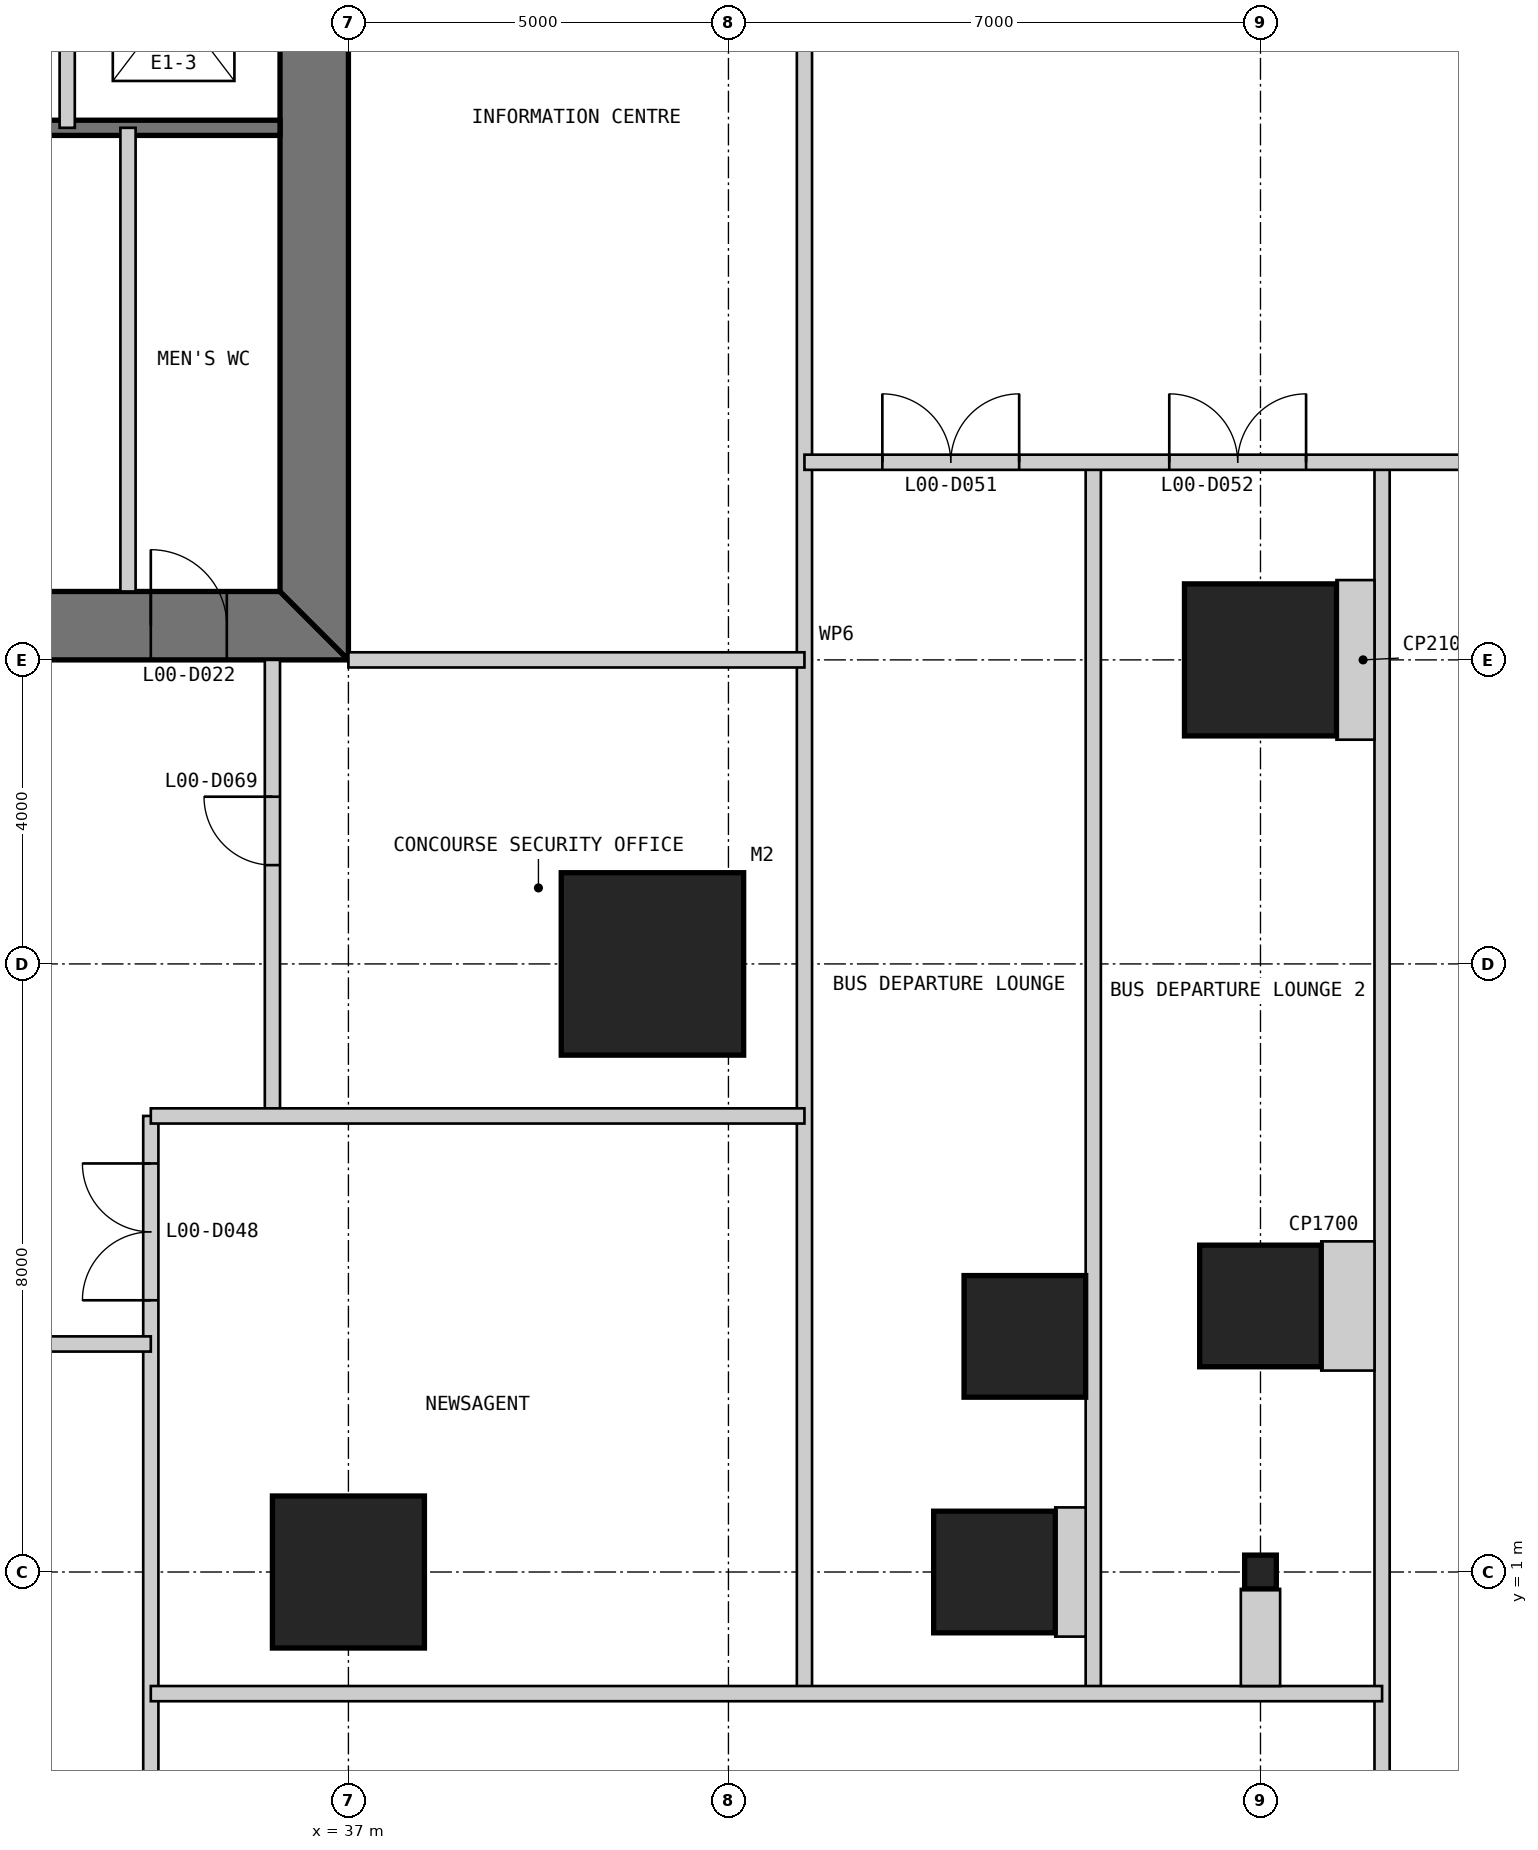
"""IFC4 building model, lengths in metres.
Left out: names, types, materials, properties, quantities, classifications, styles, units other than length and angle.
Written with IfcOpenShell. Run it as: python <this file> out.ifc"""

import sys

from ifc_helpers import new_model, si_unit, direction, frame, frame_2d, origin, origin_2d, place, context, subcontext, project, spatial, polyline, rectangle, i_section, outline, extrude, element, fill, save


model = new_model("IFC4")
c1 = context("Model", 3, precision=1e-05, world=origin(), true_north=direction((0.0, 1.0)))
c2 = subcontext(c1, "Body", "Model", "MODEL_VIEW")
j1 = project(units=[si_unit("LENGTHUNIT", "METRE"), si_unit("PLANEANGLEUNIT", "RADIAN")], contexts=[c1])
p1 = place(None, origin())
s1 = spatial("IfcSite", under=j1, at=p1, CompositionType="ELEMENT")
p2 = place(p1, origin())
s2 = spatial("IfcBuilding", under=s1, at=p2, CompositionType="ELEMENT")
p3 = place(p2, origin())
s3 = spatial("IfcBuildingStorey", under=s2, at=p3, CompositionType="ELEMENT", Elevation=0.0)
p4 = place(p3, frame((41.0, 9.0, 0.0), z_axis=(0.0, 0.0, 1.0), x_axis=(1.0, 0.0, 0.0)))
e1 = element("IfcColumn", 1, at=p4, inside=s3, PredefinedType="COLUMN", context=c2, shape_type="SweptSolid", body=[
    extrude(rectangle(XDim=2.4, YDim=2.4, at=origin_2d()), origin(), (0.0, 0.0, 1.0), 7.0),
])
p5 = place(p3, frame((37.0, 1.0, 0.0), z_axis=(0.0, 0.0, 1.0), x_axis=(1.0, 0.0, 0.0)))
e2 = element("IfcColumn", 2, at=p5, inside=s3, PredefinedType="COLUMN", context=c2, shape_type="SweptSolid", body=[
    extrude(rectangle(XDim=2.0, YDim=2.0, at=origin_2d()), origin(), (0.0, 0.0, 1.0), 7.0),
])
for number, where, z_axis, x_axis in (
    (3, (45.5, 1.0, 0.0), (0.0, 0.0, 1.0), (1.0, 0.0, 0.0)),
    (4, (45.9, 4.1, 0.0), (0.0, 0.0, 1.0), (1.0, 0.0, 0.0)),
    (5, (49.0, 4.5, 0.0), (0.0, 0.0, 1.0), (1.0, 0.0, 0.0)),
):
    element("IfcColumn", number, at=place(p3, frame(where, z_axis=z_axis, x_axis=x_axis)), inside=s3, PredefinedType="COLUMN", context=c2, shape_type="SweptSolid", body=[
        extrude(rectangle(XDim=1.6, YDim=1.6, at=origin_2d()), origin(), (0.0, 0.0, 1.0), 7.0),
    ])
p6 = place(p3, frame((49.0, 13.0, 0.0), z_axis=(0.0, 0.0, 1.0), x_axis=(1.0, 0.0, 0.0)))
e6 = element("IfcColumn", 6, at=p6, inside=s3, PredefinedType="COLUMN", context=c2, shape_type="SweptSolid", body=[
    extrude(rectangle(XDim=2.0, YDim=2.0, at=origin_2d()), origin(), (0.0, 0.0, 1.0), 7.0),
])
p7 = place(p3, frame((49.0, 1.0, 0.0), z_axis=(0.0, 0.0, 1.0), x_axis=(1.0, 0.0, 0.0)))
e7 = element("IfcColumn", 7, at=p7, inside=s3, PredefinedType="COLUMN", context=c2, shape_type="SweptSolid", body=[
    extrude(i_section(OverallWidth=0.417, OverallDepth=0.445, WebThickness=0.039, FlangeThickness=0.063, at=origin_2d()), origin(), (0.0, 0.0, 1.0), 7.0),
])
p8 = place(p3, frame((13.0, 13.45, 0.0), z_axis=(0.0, 0.0, 1.0), x_axis=(1.0, 0.0, 0.0)))
e8 = element("IfcWall", 8, at=p8, inside=s3, PredefinedType="SHEAR", context=c2, shape_type="SweptSolid", body=[
    extrude(outline(polyline([(0.0, -0.45), (24.0, -0.45), (23.1, 0.45), (0.9, 0.45), (0.0, -0.45)])), origin(), (0.0, 0.0, 1.0), 7.0),
])
p9 = place(p8, frame((4.9, 0.0, 0.0)))
e9 = element("IfcOpeningElement", 9, at=p9, cuts=e8, PredefinedType="OPENING", context=c2, shape_type="SweptSolid", body=[
    extrude(rectangle(XDim=1.0, YDim=2.2, at=frame_2d((0.5, 1.1))), frame((0.0, 0.46, 0.0), z_axis=(0.0, -1.0, 0.0), x_axis=(1.0, 0.0, 0.0)), (0.0, 0.0, 1.0), 0.92),
])
p10 = place(p8, frame((8.9, 0.0, 0.0)))
e10 = element("IfcOpeningElement", 10, at=p10, cuts=e8, PredefinedType="OPENING", context=c2, shape_type="SweptSolid", body=[
    extrude(rectangle(XDim=1.1, YDim=2.2, at=frame_2d((0.55, 1.1))), frame((0.0, 0.46, 0.0), z_axis=(0.0, -1.0, 0.0), x_axis=(1.0, 0.0, 0.0)), (0.0, 0.0, 1.0), 0.92),
])
p11 = place(p8, frame((15.05, 0.0, 0.0)))
e11 = element("IfcOpeningElement", 11, at=p11, cuts=e8, PredefinedType="OPENING", context=c2, shape_type="SweptSolid", body=[
    extrude(rectangle(XDim=0.9, YDim=2.2, at=frame_2d((0.45, 1.1))), frame((0.0, 0.46, 0.0), z_axis=(0.0, -1.0, 0.0), x_axis=(1.0, 0.0, 0.0)), (0.0, 0.0, 1.0), 0.92),
])
p12 = place(p8, frame((17.9, 0.0, 0.0)))
e12 = element("IfcOpeningElement", 12, at=p12, cuts=e8, PredefinedType="OPENING", context=c2, shape_type="SweptSolid", body=[
    extrude(rectangle(XDim=1.0, YDim=2.2, at=frame_2d((0.5, 1.1))), frame((0.0, 0.46, 0.0), z_axis=(0.0, -1.0, 0.0), x_axis=(1.0, 0.0, 0.0)), (0.0, 0.0, 1.0), 0.92),
])
p13 = place(p8, frame((21.4, 0.0, 0.0)))
e13 = element("IfcOpeningElement", 13, at=p13, cuts=e8, PredefinedType="OPENING", context=c2, shape_type="SweptSolid", body=[
    extrude(rectangle(XDim=1.0, YDim=2.2, at=frame_2d((0.5, 1.1))), frame((0.0, 0.46, 0.0), z_axis=(0.0, -1.0, 0.0), x_axis=(1.0, 0.0, 0.0)), (0.0, 0.0, 1.0), 0.92),
])
p14 = place(p3, frame((36.55, 13.9, 0.0), z_axis=(0.0, 0.0, 1.0), x_axis=(0.0, 1.0, 0.0)))
e14 = element("IfcWall", 14, at=p14, inside=s3, PredefinedType="SHEAR", context=c2, shape_type="SweptSolid", body=[
    extrude(outline(polyline([(-0.9, -0.45), (23.1, -0.45), (22.2, 0.45), (0.0, 0.45), (-0.9, -0.45)])), origin(), (0.0, 0.0, 1.0), 7.0),
])
p15 = place(p14, frame((20.2, 0.0, 0.0)))
e15 = element("IfcOpeningElement", 15, at=p15, cuts=e14, PredefinedType="OPENING", context=c2, shape_type="SweptSolid", body=[
    extrude(rectangle(XDim=1.0, YDim=2.2, at=frame_2d((0.5, 1.1))), frame((0.0, 0.46, 0.0), z_axis=(0.0, -1.0, 0.0), x_axis=(1.0, 0.0, 0.0)), (0.0, 0.0, 1.0), 0.92),
])
p16 = place(p14, frame((17.25, 0.0, 0.0)))
e16 = element("IfcOpeningElement", 16, at=p16, cuts=e14, PredefinedType="OPENING", context=c2, shape_type="SweptSolid", body=[
    extrude(rectangle(XDim=0.9, YDim=2.2, at=frame_2d((0.45, 1.1))), frame((0.0, 0.46, 0.0), z_axis=(0.0, -1.0, 0.0), x_axis=(1.0, 0.0, 0.0)), (0.0, 0.0, 1.0), 0.92),
])
p17 = place(p3, frame((20.3, 20.0, 0.0), z_axis=(0.0, 0.0, 1.0), x_axis=(1.0, 0.0, 0.0)))
e17 = element("IfcWall", 17, at=p17, inside=s3, PredefinedType="SOLIDWALL", context=c2, shape_type="SweptSolid", body=[
    extrude(rectangle(XDim=15.8, YDim=0.2, at=frame_2d((7.9, 0.0))), origin(), (0.0, 0.0, 1.0), 6.8),
])
p18 = place(p3, frame((34.1, 13.9, 0.0), z_axis=(0.0, 0.0, 1.0), x_axis=(0.0, 1.0, 0.0)))
e18 = element("IfcWall", 18, at=p18, inside=s3, PredefinedType="PARTITIONING", context=c2, shape_type="SweptSolid", body=[
    extrude(rectangle(XDim=6.1, YDim=0.2, at=frame_2d((3.05, 0.0))), origin(), (0.0, 0.0, 1.0), 6.8),
])
p19 = place(p3, frame((33.3, 36.1, 0.0), z_axis=(0.0, 0.0, 1.0), x_axis=(0.0, -1.0, 0.0)))
e19 = element("IfcWall", 19, at=p19, inside=s3, PredefinedType="PARTITIONING", context=c2, shape_type="SweptSolid", body=[
    extrude(rectangle(XDim=16.1, YDim=0.2, at=frame_2d((8.05, 0.0))), origin(), (0.0, 0.0, 1.0), 6.8),
])
p20 = place(p19, frame((4.4, 0.0, 0.0)))
e20 = element("IfcOpeningElement", 20, at=p20, cuts=e19, PredefinedType="OPENING", context=c2, shape_type="SweptSolid", body=[
    extrude(rectangle(XDim=0.9, YDim=2.2, at=frame_2d((0.45, 1.1))), frame((0.0, 0.11, 0.0), z_axis=(0.0, -1.0, 0.0), x_axis=(1.0, 0.0, 0.0)), (0.0, 0.0, 1.0), 0.22),
])
p21 = place(p19, frame((7.217, 0.0, 0.0)))
e21 = element("IfcOpeningElement", 21, at=p21, cuts=e19, PredefinedType="OPENING", context=c2, shape_type="SweptSolid", body=[
    extrude(rectangle(XDim=1.1, YDim=2.2, at=frame_2d((0.55, 1.1))), frame((0.0, 0.11, 0.0), z_axis=(0.0, -1.0, 0.0), x_axis=(1.0, 0.0, 0.0)), (0.0, 0.0, 1.0), 0.22),
])
p22 = place(p19, frame((10.55, 0.0, 0.0)))
e22 = element("IfcOpeningElement", 22, at=p22, cuts=e19, PredefinedType="OPENING", context=c2, shape_type="SweptSolid", body=[
    extrude(rectangle(XDim=1.1, YDim=2.2, at=frame_2d((0.55, 1.1))), frame((0.0, 0.11, 0.0), z_axis=(0.0, -1.0, 0.0), x_axis=(1.0, 0.0, 0.0)), (0.0, 0.0, 1.0), 0.22),
])
p23 = place(p19, frame((13.883, 0.0, 0.0)))
e23 = element("IfcOpeningElement", 23, at=p23, cuts=e19, PredefinedType="OPENING", context=c2, shape_type="SweptSolid", body=[
    extrude(rectangle(XDim=1.1, YDim=2.2, at=frame_2d((0.55, 1.1))), frame((0.0, 0.11, 0.0), z_axis=(0.0, -1.0, 0.0), x_axis=(1.0, 0.0, 0.0)), (0.0, 0.0, 1.0), 0.22),
])
p24 = place(p3, frame((34.4, -8.6, 0.0), z_axis=(0.0, 0.0, 1.0), x_axis=(0.0, 1.0, 0.0)))
e24 = element("IfcWall", 24, at=p24, inside=s3, PredefinedType="PARTITIONING", context=c2, shape_type="SweptSolid", body=[
    extrude(rectangle(XDim=15.6, YDim=0.2, at=frame_2d((7.8, 0.0))), origin(), (0.0, 0.0, 1.0), 6.7),
])
p25 = place(p24, frame((0.425, 0.0, 0.0)))
e25 = element("IfcOpeningElement", 25, at=p25, cuts=e24, PredefinedType="OPENING", context=c2, shape_type="SweptSolid", body=[
    extrude(rectangle(XDim=1.8, YDim=2.4, at=frame_2d((0.9, 1.2))), frame((0.0, 0.11, 0.0), z_axis=(0.0, -1.0, 0.0), x_axis=(1.0, 0.0, 0.0)), (0.0, 0.0, 1.0), 0.22),
])
p26 = place(p24, frame((13.175, 0.0, 0.0)))
e26 = element("IfcOpeningElement", 26, at=p26, cuts=e24, PredefinedType="OPENING", context=c2, shape_type="SweptSolid", body=[
    extrude(rectangle(XDim=1.8, YDim=2.4, at=frame_2d((0.9, 1.2))), frame((0.0, 0.11, 0.0), z_axis=(0.0, -1.0, 0.0), x_axis=(1.0, 0.0, 0.0)), (0.0, 0.0, 1.0), 0.22),
])
p27 = place(p3, frame((36.0, 7.0, 0.0), z_axis=(0.0, 0.0, 1.0), x_axis=(0.0, 1.0, 0.0)))
e27 = element("IfcWall", 27, at=p27, inside=s3, PredefinedType="PARTITIONING", context=c2, shape_type="SweptSolid", body=[
    extrude(rectangle(XDim=6.0, YDim=0.2, at=frame_2d((3.0, 0.0))), origin(), (0.0, 0.0, 1.0), 6.7),
])
p28 = place(p27, frame((3.3, 0.0, 0.0)))
e28 = element("IfcOpeningElement", 28, at=p28, cuts=e27, PredefinedType="OPENING", context=c2, shape_type="SweptSolid", body=[
    extrude(rectangle(XDim=0.9, YDim=2.2, at=frame_2d((0.45, 1.1))), frame((0.0, 0.11, 0.0), z_axis=(0.0, -1.0, 0.0), x_axis=(1.0, 0.0, 0.0)), (0.0, 0.0, 1.0), 0.22),
])
p29 = place(p3, frame((43.0, -0.6, 0.0), z_axis=(0.0, 0.0, 1.0), x_axis=(0.0, 1.0, 0.0)))
e29 = element("IfcWall", 29, at=p29, inside=s3, PredefinedType="PARTITIONING", context=c2, shape_type="SweptSolid", body=[
    extrude(rectangle(XDim=28.6, YDim=0.2, at=frame_2d((14.3, 0.0))), origin(), (0.0, 0.0, 1.0), 6.043),
])
p30 = place(p3, frame((46.8, -0.6, 0.0), z_axis=(0.0, 0.0, 1.0), x_axis=(0.0, 1.0, 0.0)))
e30 = element("IfcWall", 30, at=p30, inside=s3, PredefinedType="PARTITIONING", context=c2, shape_type="SweptSolid", body=[
    extrude(rectangle(XDim=16.2, YDim=0.2, at=frame_2d((8.1, 0.0))), origin(), (0.0, 0.0, 1.0), 6.7),
])
p31 = place(p3, frame((50.6, -8.6, 0.0), z_axis=(0.0, 0.0, 1.0), x_axis=(0.0, 1.0, 0.0)))
e31 = element("IfcWall", 31, at=p31, inside=s3, PredefinedType="PARTITIONING", context=c2, shape_type="SweptSolid", body=[
    extrude(rectangle(XDim=24.2, YDim=0.2, at=frame_2d((12.1, 0.0))), origin(), (0.0, 0.0, 1.0), 6.7),
])
p32 = place(p3, frame((34.4, -0.6, 0.0), z_axis=(0.0, 0.0, 1.0), x_axis=(1.0, 0.0, 0.0)))
e32 = element("IfcWall", 32, at=p32, inside=s3, PredefinedType="PARTITIONING", context=c2, shape_type="SweptSolid", body=[
    extrude(rectangle(XDim=16.2, YDim=0.2, at=frame_2d((8.1, 0.0))), origin(), (0.0, 0.0, 1.0), 6.7),
])
p33 = place(p3, frame((26.4, 4.0, 0.0), z_axis=(0.0, 0.0, 1.0), x_axis=(1.0, 0.0, 0.0)))
e33 = element("IfcWall", 33, at=p33, inside=s3, PredefinedType="PARTITIONING", context=c2, shape_type="SweptSolid", body=[
    extrude(rectangle(XDim=8.0, YDim=0.2, at=frame_2d((4.0, 0.0))), origin(), (0.0, 0.0, 1.0), 6.7),
])
p34 = place(p33, frame((3.1, 0.0, 0.0)))
e34 = element("IfcOpeningElement", 34, at=p34, cuts=e33, PredefinedType="OPENING", context=c2, shape_type="SweptSolid", body=[
    extrude(rectangle(XDim=1.8, YDim=2.4, at=frame_2d((0.9, 1.2))), frame((0.0, 0.11, 0.0), z_axis=(0.0, -1.0, 0.0), x_axis=(1.0, 0.0, 0.0)), (0.0, 0.0, 1.0), 0.22),
])
p35 = place(p3, frame((34.4, 7.0, 0.0), z_axis=(0.0, 0.0, 1.0), x_axis=(1.0, 0.0, 0.0)))
e35 = element("IfcWall", 35, at=p35, inside=s3, PredefinedType="PARTITIONING", context=c2, shape_type="SweptSolid", body=[
    extrude(rectangle(XDim=8.6, YDim=0.2, at=frame_2d((4.3, 0.0))), origin(), (0.0, 0.0, 1.0), 6.7),
])
p36 = place(p3, frame((37.0, 13.0, 0.0), z_axis=(0.0, 0.0, 1.0), x_axis=(1.0, 0.0, 0.0)))
e36 = element("IfcWall", 36, at=p36, inside=s3, PredefinedType="PARTITIONING", context=c2, shape_type="SweptSolid", body=[
    extrude(rectangle(XDim=6.0, YDim=0.2, at=frame_2d((3.0, 0.0))), origin(), (0.0, 0.0, 1.0), 5.853),
])
p37 = place(p3, frame((43.0, 15.6, 0.0), z_axis=(0.0, 0.0, 1.0), x_axis=(1.0, 0.0, 0.0)))
e37 = element("IfcWall", 37, at=p37, inside=s3, PredefinedType="PARTITIONING", context=c2, shape_type="SweptSolid", body=[
    extrude(rectangle(XDim=22.25, YDim=0.2, at=frame_2d((11.125, 0.0))), origin(), (0.0, 0.0, 1.0), 6.7),
])
p38 = place(p37, frame((10.125, 0.0, 0.0)))
e38 = element("IfcOpeningElement", 38, at=p38, cuts=e37, PredefinedType="OPENING", context=c2, shape_type="SweptSolid", body=[
    extrude(rectangle(XDim=1.8, YDim=2.4, at=frame_2d((0.9, 1.2))), frame((0.0, 0.11, 0.0), z_axis=(0.0, -1.0, 0.0), x_axis=(1.0, 0.0, 0.0)), (0.0, 0.0, 1.0), 0.22),
])
p39 = place(p37, frame((17.425, 0.0, 0.0)))
e39 = element("IfcOpeningElement", 39, at=p39, cuts=e37, PredefinedType="OPENING", context=c2, shape_type="SweptSolid", body=[
    extrude(rectangle(XDim=1.8, YDim=2.4, at=frame_2d((0.9, 1.2))), frame((0.0, 0.11, 0.0), z_axis=(0.0, -1.0, 0.0), x_axis=(1.0, 0.0, 0.0)), (0.0, 0.0, 1.0), 0.22),
])
p40 = place(p37, frame((1.025, 0.0, 0.0)))
e40 = element("IfcOpeningElement", 40, at=p40, cuts=e37, PredefinedType="OPENING", context=c2, shape_type="SweptSolid", body=[
    extrude(rectangle(XDim=1.8, YDim=2.4, at=frame_2d((0.9, 1.2))), frame((0.0, 0.11, 0.0), z_axis=(0.0, -1.0, 0.0), x_axis=(1.0, 0.0, 0.0)), (0.0, 0.0, 1.0), 0.22),
])
p41 = place(p37, frame((4.8, 0.0, 0.0)))
e41 = element("IfcOpeningElement", 41, at=p41, cuts=e37, PredefinedType="OPENING", context=c2, shape_type="SweptSolid", body=[
    extrude(rectangle(XDim=1.8, YDim=2.4, at=frame_2d((0.9, 1.2))), frame((0.0, 0.11, 0.0), z_axis=(0.0, -1.0, 0.0), x_axis=(1.0, 0.0, 0.0)), (0.0, 0.0, 1.0), 0.22),
])
p42 = place(p3, frame((46.7, 1.0, 0.0), z_axis=(0.0, 0.0, 1.0), x_axis=(-1.0, 0.0, 0.0)))
e42 = element("IfcWall", 42, at=p42, inside=s3, PredefinedType="PARTITIONING", context=c2, shape_type="SweptSolid", body=[
    extrude(rectangle(XDim=0.4, YDim=1.7, at=frame_2d((0.2, 0.0))), origin(), (0.0, 0.0, 1.0), 6.7),
])
p43 = place(p3, frame((50.5, 4.5, 0.0), z_axis=(0.0, 0.0, 1.0), x_axis=(-1.0, 0.0, 0.0)))
e43 = element("IfcWall", 43, at=p43, inside=s3, PredefinedType="PARTITIONING", context=c2, shape_type="SweptSolid", body=[
    extrude(rectangle(XDim=0.7, YDim=1.7, at=frame_2d((0.35, 0.0))), origin(), (0.0, 0.0, 1.0), 6.7),
])
p44 = place(p3, frame((50.5, 13.0, 0.0), z_axis=(0.0, 0.0, 1.0), x_axis=(-1.0, 0.0, 0.0)))
e44 = element("IfcWall", 44, at=p44, inside=s3, PredefinedType="PARTITIONING", context=c2, shape_type="SweptSolid", body=[
    extrude(rectangle(XDim=0.5, YDim=2.1, at=frame_2d((0.25, 0.0))), origin(), (0.0, 0.0, 1.0), 6.7),
])
p45 = place(p3, frame((49.0, -0.5, 0.0), z_axis=(0.0, 0.0, 1.0), x_axis=(0.0, 1.0, 0.0)))
e45 = element("IfcWall", 45, at=p45, inside=s3, PredefinedType="PARTITIONING", context=c2, shape_type="SweptSolid", body=[
    extrude(rectangle(XDim=1.278, YDim=0.517, at=frame_2d((0.639, 0.0))), origin(), (0.0, 0.0, 1.0), 5.954),
])
p46 = place(p13, origin())
e46 = element("IfcDoor", 46, at=p46, inside=s3, OperationType="SINGLE_SWING_LEFT", PredefinedType="DOOR", context=c2, shape_type="SweptSolid", body=[
    extrude(rectangle(XDim=1.0, YDim=2.2, at=frame_2d((0.5, 1.1))), frame((0.0, 0.025, 0.0), z_axis=(0.0, -1.0, 0.0), x_axis=(1.0, 0.0, 0.0)), (0.0, 0.0, 1.0), 0.05),
    extrude(outline(polyline([(0.0, 0.0), (0.04, 0.0), (0.04, 2.16), (0.96, 2.16), (0.96, 0.0), (1.0, 0.0), (1.0, 2.2), (0.0, 2.2), (0.0, 0.0)])), frame((0.0, 0.3, 0.0), z_axis=(0.0, -1.0, 0.0), x_axis=(1.0, 0.0, 0.0)), (0.0, 0.0, 1.0), 0.6),
])
fill(e13, e46)
p47 = place(p26, origin())
e47 = element("IfcDoor", 47, at=p47, inside=s3, OperationType="DOUBLE_DOOR_SINGLE_SWING", PredefinedType="DOOR", context=c2, shape_type="SweptSolid", body=[
    extrude(rectangle(XDim=1.8, YDim=2.4, at=frame_2d((0.9, 1.2))), frame((0.0, 0.025, 0.0), z_axis=(0.0, -1.0, 0.0), x_axis=(1.0, 0.0, 0.0)), (0.0, 0.0, 1.0), 0.05),
])
fill(e26, e47)
p48 = place(p40, origin())
e48 = element("IfcDoor", 48, at=p48, inside=s3, OperationType="DOUBLE_DOOR_SINGLE_SWING", PredefinedType="DOOR", context=c2, shape_type="SweptSolid", body=[
    extrude(rectangle(XDim=1.8, YDim=2.4, at=frame_2d((0.9, 1.2))), frame((0.0, 0.025, 0.0), z_axis=(0.0, -1.0, 0.0), x_axis=(1.0, 0.0, 0.0)), (0.0, 0.0, 1.0), 0.05),
])
fill(e40, e48)
p49 = place(p41, origin())
e49 = element("IfcDoor", 49, at=p49, inside=s3, OperationType="DOUBLE_DOOR_SINGLE_SWING", PredefinedType="DOOR", context=c2, shape_type="SweptSolid", body=[
    extrude(rectangle(XDim=1.8, YDim=2.4, at=frame_2d((0.9, 1.2))), frame((0.0, 0.025, 0.0), z_axis=(0.0, -1.0, 0.0), x_axis=(1.0, 0.0, 0.0)), (0.0, 0.0, 1.0), 0.05),
])
fill(e41, e49)
p50 = place(p28, origin())
e50 = element("IfcDoor", 50, at=p50, inside=s3, OperationType="SINGLE_SWING_RIGHT", PredefinedType="DOOR", context=c2, shape_type="SweptSolid", body=[
    extrude(rectangle(XDim=0.9, YDim=2.2, at=frame_2d((0.45, 1.1))), frame((0.0, 0.025, 0.0), z_axis=(0.0, -1.0, 0.0), x_axis=(1.0, 0.0, 0.0)), (0.0, 0.0, 1.0), 0.05),
])
fill(e28, e50)
save(model, sys.argv[1])
